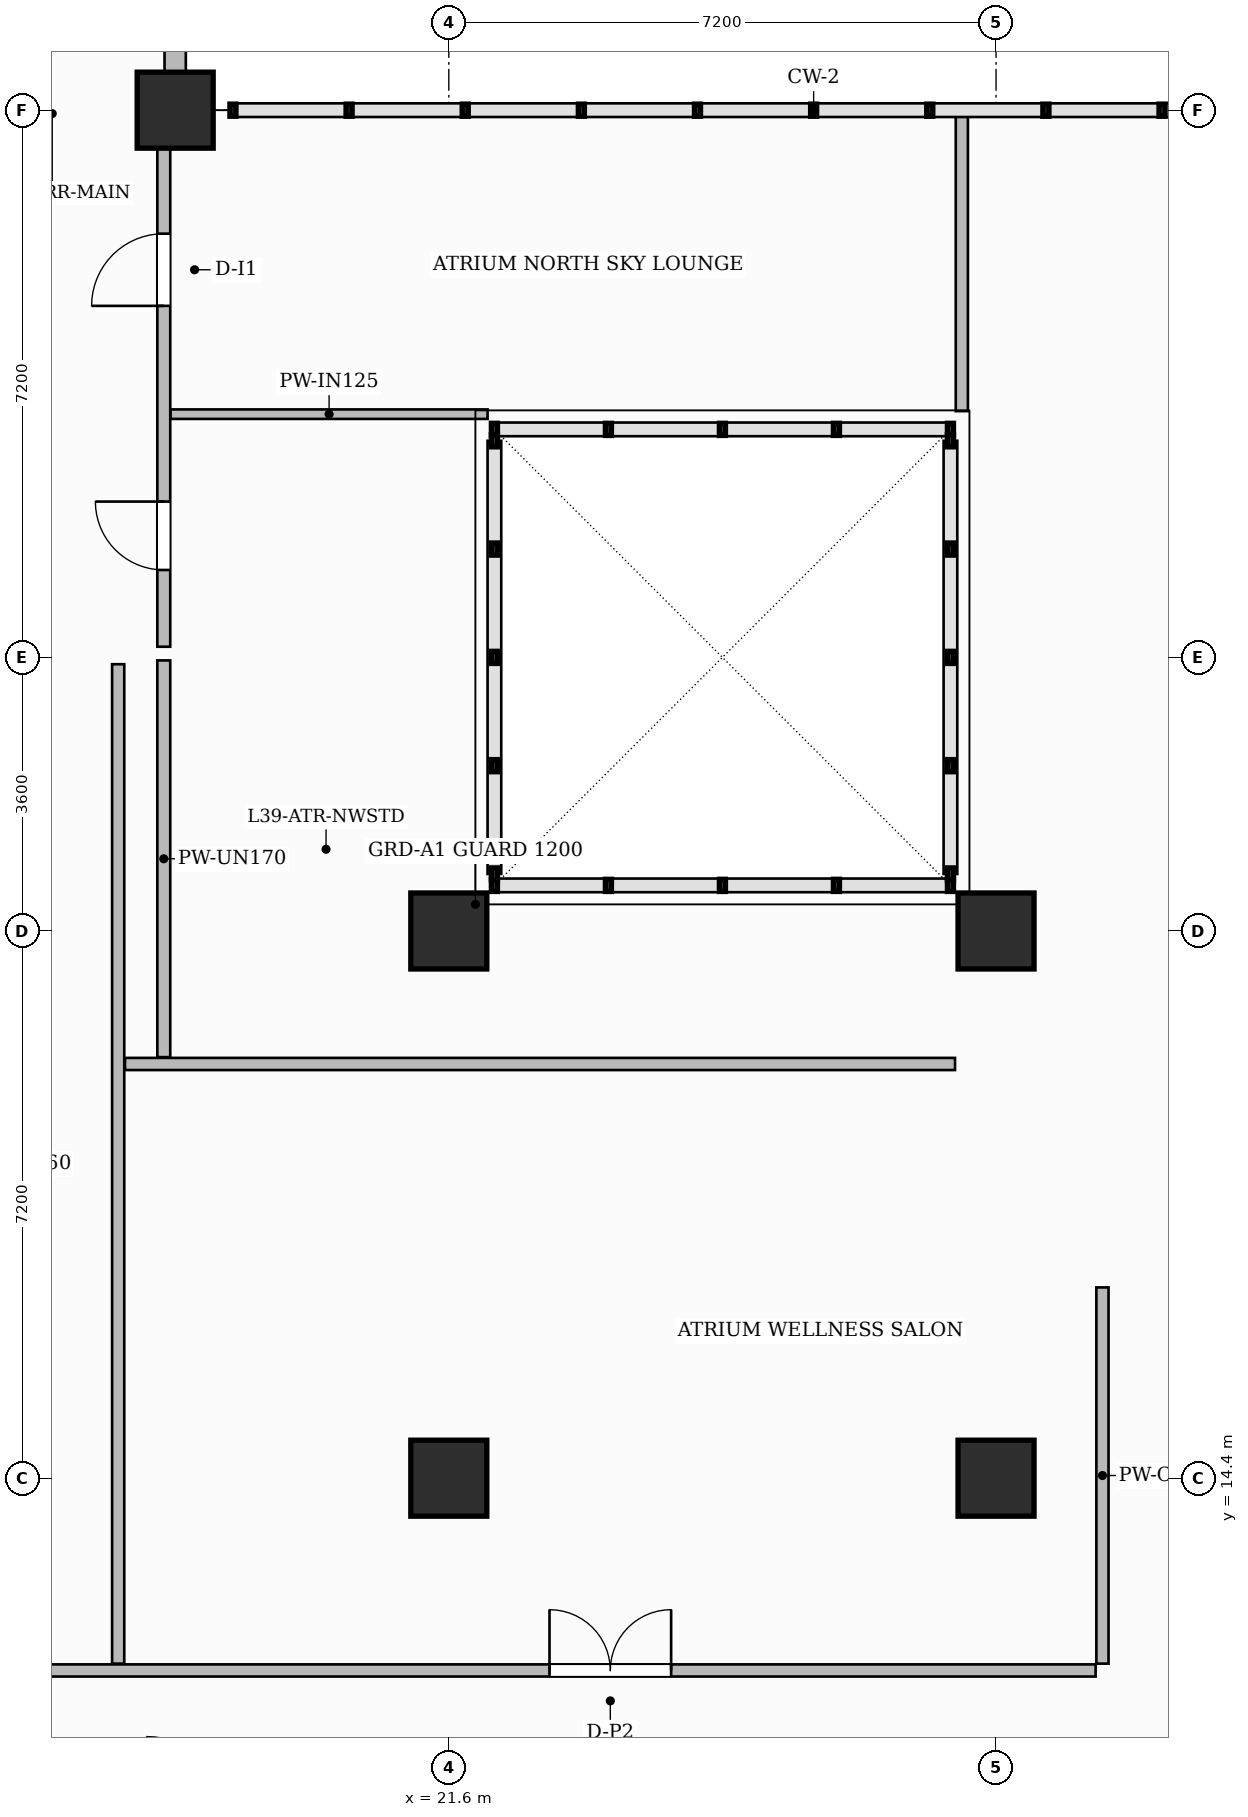
"""IFC4 building model, lengths in metres.
Left out: names, types, materials, properties, quantities, classifications, styles, units other than length and angle.
Written with IfcOpenShell. Run it as: python <this file> out.ifc"""

import sys

from ifc_helpers import new_model, si_unit, direction, frame, frame_2d, origin, origin_2d, place, context, subcontext, project, spatial, rectangle, extrude, source, transform, mapped, element, fill, save


model = new_model("IFC4")
c1 = context("Model", 3, precision=1e-05, world=origin(), true_north=direction((0.0, 1.0)))
c2 = subcontext(c1, "Body", "Model", "MODEL_VIEW")
j1 = project(units=[si_unit("LENGTHUNIT", "METRE"), si_unit("PLANEANGLEUNIT", "RADIAN")], contexts=[c1])
p1 = place(None, origin())
s1 = spatial("IfcSite", under=j1, at=p1, CompositionType="ELEMENT")
p2 = place(p1, origin())
s2 = spatial("IfcBuilding", under=s1, at=p2, CompositionType="ELEMENT")
p3 = place(p2, frame((0.0, 0.0, 158.0)))
s3 = spatial("IfcBuildingStorey", under=s2, at=p3, CompositionType="ELEMENT", Elevation=158.0)
m1 = source(origin(), c2, "Body", "SweptSolid", [
    extrude(rectangle(XDim=1.0, YDim=1.0, at=origin_2d()), origin(), (0.0, 0.0, 1.0), 3.85),
])
for number, where, z_axis, x_axis in (
    (1, (21.6, 14.4, 0.0), (0.0, 0.0, 1.0), (1.0, 0.0, 0.0)),
    (2, (21.6, 21.6, 0.0), (0.0, 0.0, 1.0), (1.0, 0.0, 0.0)),
    (3, (28.8, 14.4, 0.0), (0.0, 0.0, 1.0), (1.0, 0.0, 0.0)),
    (4, (28.8, 21.6, 0.0), (0.0, 0.0, 1.0), (1.0, 0.0, 0.0)),
    (5, (18.0, 32.4, 0.0), (0.0, 0.0, 1.0), (1.0, 0.0, 0.0)),
):
    element("IfcColumn", number, at=place(p3, frame(where, z_axis=z_axis, x_axis=x_axis)), inside=s3, PredefinedType="COLUMN", context=c2, shape_type="MappedRepresentation", body=[
        mapped(m1, transform((0.0, 0.0, 0.0), scale=1.0)),
    ])
p4 = place(p3, frame((14.548, 11.87, 0.0), z_axis=(0.0, 0.0, 1.0), x_axis=(1.0, 0.0, 0.0)))
e6 = element("IfcWall", 6, at=p4, inside=s3, PredefinedType="PARTITIONING", context=c2, shape_type="SweptSolid", body=[
    extrude(rectangle(XDim=15.562, YDim=0.16, at=frame_2d((7.781, 0.0))), origin(), (0.0, 0.0, 1.0), 3.6),
])
p5 = place(p4, frame((8.377, 0.0, 0.0)))
e7 = element("IfcOpeningElement", 7, at=p5, cuts=e6, PredefinedType="OPENING", context=c2, shape_type="SweptSolid", body=[
    extrude(rectangle(XDim=1.6, YDim=2.4, at=frame_2d((0.8, 1.2))), frame((0.0, 0.09, 0.0), z_axis=(0.0, -1.0, 0.0), x_axis=(1.0, 0.0, 0.0)), (0.0, 0.0, 1.0), 0.18),
])
p6 = place(p3, frame((30.2, 11.96, 0.0), z_axis=(0.0, 0.0, 1.0), x_axis=(0.0, 1.0, 0.0)))
e8 = element("IfcWall", 8, at=p6, inside=s3, PredefinedType="PARTITIONING", context=c2, shape_type="SweptSolid", body=[
    extrude(rectangle(XDim=4.95, YDim=0.16, at=frame_2d((2.475, 0.0))), origin(), (0.0, 0.0, 1.0), 3.6),
])
p7 = place(p3, frame((17.25, 11.96, 0.0), z_axis=(0.0, 0.0, 1.0), x_axis=(0.0, 1.0, 0.0)))
e9 = element("IfcWall", 9, at=p7, inside=s3, PredefinedType="PARTITIONING", context=c2, shape_type="SweptSolid", body=[
    extrude(rectangle(XDim=13.15, YDim=0.16, at=frame_2d((6.575, 0.0))), origin(), (0.0, 0.0, 1.0), 3.6),
])
p8 = place(p3, frame((17.85, 19.94, 0.0), z_axis=(0.0, 0.0, 1.0), x_axis=(0.0, 1.0, 0.0)))
e10 = element("IfcWall", 10, at=p8, inside=s3, PredefinedType="PARTITIONING", context=c2, shape_type="SweptSolid", body=[
    extrude(rectangle(XDim=5.22, YDim=0.17, at=frame_2d((2.61, 0.0))), origin(), (0.0, 0.0, 1.0), 3.285),
])
p9 = place(p3, frame((17.85, 25.34, 0.0), z_axis=(0.0, 0.0, 1.0), x_axis=(0.0, 1.0, 0.0)))
e11 = element("IfcWall", 11, at=p9, inside=s3, PredefinedType="PARTITIONING", context=c2, shape_type="SweptSolid", body=[
    extrude(rectangle(XDim=6.87, YDim=0.17, at=frame_2d((3.435, 0.0))), origin(), (0.0, 0.0, 1.0), 3.6),
])
p10 = place(p9, frame((1.01, 0.0, 0.0)))
e12 = element("IfcOpeningElement", 12, at=p10, cuts=e11, PredefinedType="OPENING", context=c2, shape_type="SweptSolid", body=[
    extrude(rectangle(XDim=0.9, YDim=2.15, at=frame_2d((0.45, 1.075))), frame((0.0, 0.095, 0.0), z_axis=(0.0, -1.0, 0.0), x_axis=(1.0, 0.0, 0.0)), (0.0, 0.0, 1.0), 0.19),
])
p11 = place(p9, frame((4.485, 0.0, 0.0)))
e13 = element("IfcOpeningElement", 13, at=p11, cuts=e11, PredefinedType="OPENING", context=c2, shape_type="SweptSolid", body=[
    extrude(rectangle(XDim=0.95, YDim=2.15, at=frame_2d((0.475, 1.075))), frame((0.0, 0.095, 0.0), z_axis=(0.0, -1.0, 0.0), x_axis=(1.0, 0.0, 0.0)), (0.0, 0.0, 1.0), 0.19),
])
p12 = place(p3, frame((28.35, 28.44, 0.0), z_axis=(0.0, 0.0, 1.0), x_axis=(0.0, 1.0, 0.0)))
e14 = element("IfcWall", 14, at=p12, inside=s3, PredefinedType="PARTITIONING", context=c2, shape_type="SweptSolid", body=[
    extrude(rectangle(XDim=3.932, YDim=0.16, at=frame_2d((1.966, 0.0))), origin(), (0.0, 0.0, 1.0), 3.6),
])
p13 = place(p3, frame((17.94, 28.4, 0.0), z_axis=(0.0, 0.0, 1.0), x_axis=(1.0, 0.0, 0.0)))
e15 = element("IfcWall", 15, at=p13, inside=s3, PredefinedType="PARTITIONING", context=c2, shape_type="SweptSolid", body=[
    extrude(rectangle(XDim=4.17, YDim=0.125, at=frame_2d((2.085, 0.0))), origin(), (0.0, 0.0, 1.0), 3.6),
])
p14 = place(p3, frame((17.34, 19.85, 0.0), z_axis=(0.0, 0.0, 1.0), x_axis=(1.0, 0.0, 0.0)))
e16 = element("IfcWall", 16, at=p14, inside=s3, PredefinedType="PARTITIONING", context=c2, shape_type="SweptSolid", body=[
    extrude(rectangle(XDim=10.92, YDim=0.16, at=frame_2d((5.46, 0.0))), origin(), (0.0, 0.0, 1.0), 3.6),
])
p15 = place(p3, frame((18.0, 32.4, 0.0), z_axis=(0.0, 0.0, 1.0), x_axis=(0.0, 1.0, 0.0)))
e17 = element("IfcWall", 17, at=p15, inside=s3, PredefinedType="SOLIDWALL", context=c2, shape_type="SweptSolid", body=[
    extrude(rectangle(XDim=14.35, YDim=0.28, at=frame_2d((7.175, 0.0))), origin(), (0.0, 0.0, 1.0), 3.6),
])
p16 = place(p15, frame((1.5, 0.0, 0.0)))
e18 = element("IfcOpeningElement", 18, at=p16, cuts=e17, PredefinedType="OPENING", context=c2, shape_type="SweptSolid", body=[
    extrude(rectangle(XDim=1.2, YDim=2.2, at=frame_2d((0.6, 1.1))), frame((0.0, 0.15, 0.0), z_axis=(0.0, -1.0, 0.0), x_axis=(1.0, 0.0, 0.0)), (0.0, 0.0, 1.0), 0.3),
])
p17 = place(p15, frame((3.8, 0.0, 0.8)))
e19 = element("IfcOpeningElement", 19, at=p17, cuts=e17, PredefinedType="OPENING", context=c2, shape_type="SweptSolid", body=[
    extrude(rectangle(XDim=1.8, YDim=1.85, at=frame_2d((0.9, 0.925))), frame((0.0, 0.15, 0.0), z_axis=(0.0, -1.0, 0.0), x_axis=(1.0, 0.0, 0.0)), (0.0, 0.0, 1.0), 0.3),
])
p18 = place(p15, frame((8.525, 0.0, 0.8)))
e20 = element("IfcOpeningElement", 20, at=p18, cuts=e17, PredefinedType="OPENING", context=c2, shape_type="SweptSolid", body=[
    extrude(rectangle(XDim=1.8, YDim=1.85, at=frame_2d((0.9, 0.925))), frame((0.0, 0.15, 0.0), z_axis=(0.0, -1.0, 0.0), x_axis=(1.0, 0.0, 0.0)), (0.0, 0.0, 1.0), 0.3),
])
p19 = place(p15, frame((11.275, 0.0, 0.8)))
e21 = element("IfcOpeningElement", 21, at=p19, cuts=e17, PredefinedType="OPENING", context=c2, shape_type="SweptSolid", body=[
    extrude(rectangle(XDim=1.8, YDim=1.85, at=frame_2d((0.9, 0.925))), frame((0.0, 0.15, 0.0), z_axis=(0.0, -1.0, 0.0), x_axis=(1.0, 0.0, 0.0)), (0.0, 0.0, 1.0), 0.3),
])
m2 = source(origin(), c2, "Body", "SweptSolid", [
    extrude(rectangle(XDim=0.9, YDim=2.15, at=frame_2d((0.45, 1.075))), frame((0.0, 0.025, 0.0), z_axis=(0.0, -1.0, 0.0), x_axis=(1.0, 0.0, 0.0)), (0.0, 0.0, 1.0), 0.05),
])
p20 = place(p10, origin())
e22 = element("IfcDoor", 22, at=p20, inside=s3, OperationType="SINGLE_SWING_RIGHT", PredefinedType="DOOR", context=c2, shape_type="MappedRepresentation", body=[
    mapped(m2, transform((0.0, 0.0, 0.0), scale=1.0)),
])
fill(e12, e22)
m3 = source(origin(), c2, "Body", "SweptSolid", [
    extrude(rectangle(XDim=0.95, YDim=2.15, at=frame_2d((0.475, 1.075))), frame((0.0, 0.025, 0.0), z_axis=(0.0, -1.0, 0.0), x_axis=(1.0, 0.0, 0.0)), (0.0, 0.0, 1.0), 0.05),
])
p21 = place(p11, origin())
e23 = element("IfcDoor", 23, at=p21, inside=s3, OperationType="SINGLE_SWING_LEFT", PredefinedType="DOOR", context=c2, shape_type="MappedRepresentation", body=[
    mapped(m3, transform((0.0, 0.0, 0.0), scale=1.0)),
])
fill(e13, e23)
m4 = source(origin(), c2, "Body", "SweptSolid", [
    extrude(rectangle(XDim=1.6, YDim=2.4, at=frame_2d((0.8, 1.2))), frame((0.0, 0.025, 0.0), z_axis=(0.0, -1.0, 0.0), x_axis=(1.0, 0.0, 0.0)), (0.0, 0.0, 1.0), 0.05),
])
p22 = place(p5, origin())
e24 = element("IfcDoor", 24, at=p22, inside=s3, OperationType="DOUBLE_DOOR_SINGLE_SWING", PredefinedType="DOOR", context=c2, shape_type="MappedRepresentation", body=[
    mapped(m4, transform((0.0, 0.0, 0.0), scale=1.0)),
])
fill(e7, e24)
save(model, sys.argv[1])
